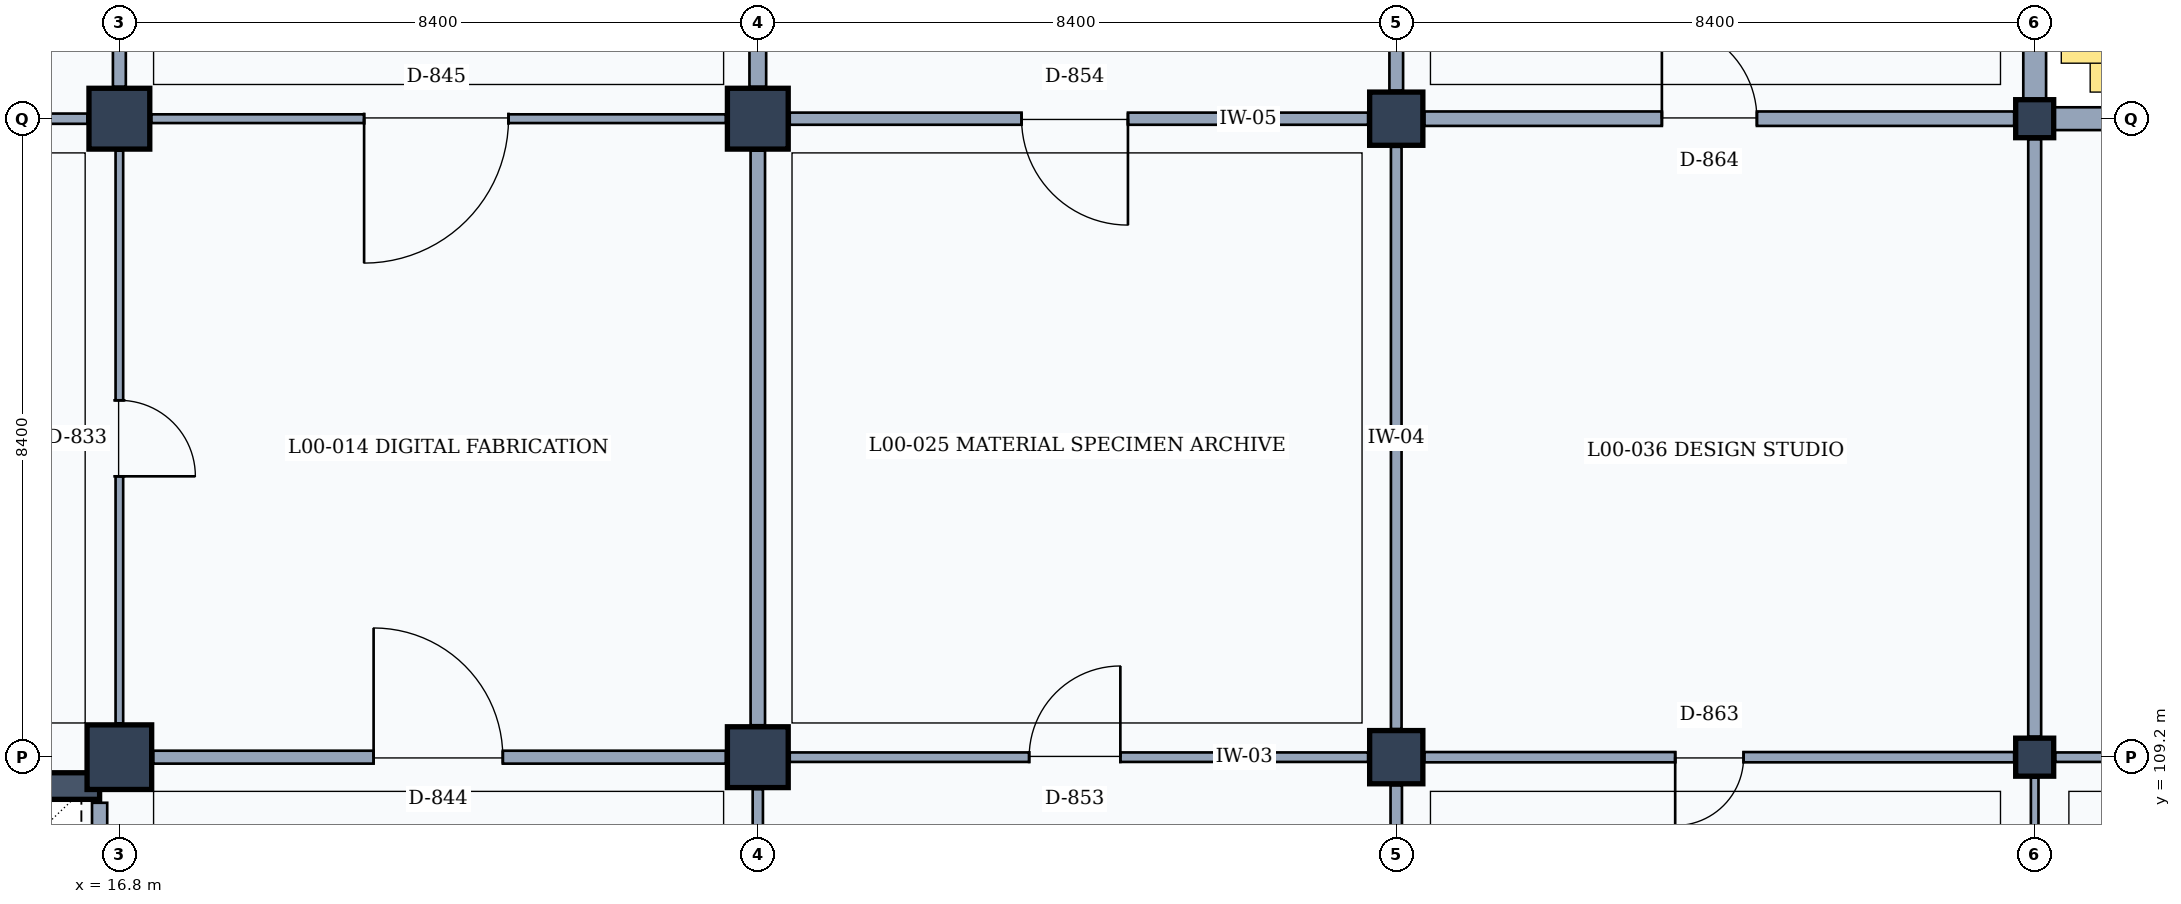
"""IFC4 building model, lengths in metres.
Left out: names, types, materials, properties, quantities, classifications, styles, units other than length and angle.
Written with IfcOpenShell. Run it as: python <this file> out.ifc"""

import sys

from ifc_helpers import new_model, si_unit, direction, frame, frame_2d, origin, origin_2d, place, context, subcontext, project, spatial, rectangle, extrude, element, fill, save


model = new_model("IFC4")
c1 = context("Model", 3, precision=1e-05, world=origin(), true_north=direction((0.0, 1.0)))
c2 = subcontext(c1, "Body", "Model", "MODEL_VIEW")
j1 = project(units=[si_unit("LENGTHUNIT", "METRE"), si_unit("PLANEANGLEUNIT", "RADIAN")], contexts=[c1])
p1 = place(None, origin())
s1 = spatial("IfcSite", under=j1, at=p1, CompositionType="ELEMENT")
p2 = place(p1, origin())
s2 = spatial("IfcBuilding", under=s1, at=p2, CompositionType="ELEMENT")
p3 = place(p2, origin())
s3 = spatial("IfcBuildingStorey", under=s2, at=p3, CompositionType="ELEMENT", Elevation=0.0)
p4 = place(p3, frame((16.8, 109.2, 0.0), z_axis=(0.0, 0.0, 1.0), x_axis=(1.0, 0.0, 0.0)))
e1 = element("IfcColumn", 1, at=p4, inside=s3, PredefinedType="COLUMN", context=c2, shape_type="SweptSolid", body=[
    extrude(rectangle(XDim=0.85, YDim=0.85, at=origin_2d()), origin(), (0.0, 0.0, 1.0), 4.8),
])
for number, where, z_axis, x_axis in (
    (2, (16.8, 117.6, 0.0), (0.0, 0.0, 1.0), (1.0, 0.0, 0.0)),
    (3, (25.2, 109.2, 0.0), (0.0, 0.0, 1.0), (1.0, 0.0, 0.0)),
    (4, (25.2, 117.6, 0.0), (0.0, 0.0, 1.0), (1.0, 0.0, 0.0)),
):
    element("IfcColumn", number, at=place(p3, frame(where, z_axis=z_axis, x_axis=x_axis)), inside=s3, PredefinedType="COLUMN", context=c2, shape_type="SweptSolid", body=[
        extrude(rectangle(XDim=0.8, YDim=0.8, at=origin_2d()), origin(), (0.0, 0.0, 1.0), 4.8),
    ])
for number, where, z_axis, x_axis in (
    (5, (33.6, 109.2, 0.0), (0.0, 0.0, 1.0), (1.0, 0.0, 0.0)),
    (6, (33.6, 117.6, 0.0), (0.0, 0.0, 1.0), (1.0, 0.0, 0.0)),
):
    element("IfcColumn", number, at=place(p3, frame(where, z_axis=z_axis, x_axis=x_axis)), inside=s3, PredefinedType="COLUMN", context=c2, shape_type="SweptSolid", body=[
        extrude(rectangle(XDim=0.7, YDim=0.7, at=origin_2d()), origin(), (0.0, 0.0, 1.0), 4.8),
    ])
for number, where, z_axis, x_axis in (
    (7, (42.0, 109.2, 0.0), (0.0, 0.0, 1.0), (1.0, 0.0, 0.0)),
    (8, (42.0, 117.6, 0.0), (0.0, 0.0, 1.0), (1.0, 0.0, 0.0)),
):
    element("IfcColumn", number, at=place(p3, frame(where, z_axis=z_axis, x_axis=x_axis)), inside=s3, PredefinedType="COLUMN", context=c2, shape_type="SweptSolid", body=[
        extrude(rectangle(XDim=0.5, YDim=0.5, at=origin_2d()), origin(), (0.0, 0.0, 1.0), 4.8),
    ])
p5 = place(p3, frame((42.0, 125.75, 0.0), z_axis=(0.0, 0.0, 1.0), x_axis=(0.0, -1.0, 0.0)))
e9 = element("IfcWall", 9, at=p5, inside=s3, PredefinedType="SOLIDWALL", context=c2, shape_type="SweptSolid", body=[
    extrude(rectangle(XDim=7.9, YDim=0.3, at=frame_2d((3.95, 0.0))), origin(), (0.0, 0.0, 1.0), 3.96),
])
p6 = place(p5, frame((3.05, 0.0, 0.95)))
e10 = element("IfcOpeningElement", 10, at=p6, cuts=e9, PredefinedType="OPENING", context=c2, shape_type="SweptSolid", body=[
    extrude(rectangle(XDim=1.8, YDim=1.5, at=frame_2d((0.9, 0.75))), frame((0.0, 0.16, 0.0), z_axis=(0.0, -1.0, 0.0), x_axis=(1.0, 0.0, 0.0)), (0.0, 0.0, 1.0), 0.32),
])
p7 = place(p3, frame((42.25, 117.6, 0.0), z_axis=(0.0, 0.0, 1.0), x_axis=(1.0, 0.0, 0.0)))
e11 = element("IfcWall", 11, at=p7, inside=s3, PredefinedType="SOLIDWALL", context=c2, shape_type="SweptSolid", body=[
    extrude(rectangle(XDim=7.85, YDim=0.3, at=frame_2d((3.925, 0.0))), origin(), (0.0, 0.0, 1.0), 3.96),
])
p8 = place(p7, frame((2.525, 0.0, 0.95)))
e12 = element("IfcOpeningElement", 12, at=p8, cuts=e11, PredefinedType="OPENING", context=c2, shape_type="SweptSolid", body=[
    extrude(rectangle(XDim=2.8, YDim=1.65, at=frame_2d((1.4, 0.825))), frame((0.0, 0.16, 0.0), z_axis=(0.0, -1.0, 0.0), x_axis=(1.0, 0.0, 0.0)), (0.0, 0.0, 1.0), 0.32),
])
p9 = place(p3, frame((8.665, 108.82, 0.0), z_axis=(0.0, 0.0, 1.0), x_axis=(1.0, 0.0, 0.0)))
e13 = element("IfcWall", 13, at=p9, inside=s3, PredefinedType="SHEAR", context=c2, shape_type="SweptSolid", body=[
    extrude(rectangle(XDim=7.875, YDim=0.35, at=frame_2d((3.938, 0.0))), origin(), (0.0, 0.0, 1.0), 4.55),
])
p10 = place(p3, frame((16.54, 108.6, 0.0), z_axis=(0.0, 0.0, 1.0), x_axis=(0.0, -1.0, 0.0)))
e14 = element("IfcWall", 14, at=p10, inside=s3, PredefinedType="PARTITIONING", context=c2, shape_type="SweptSolid", body=[
    extrude(rectangle(XDim=7.2, YDim=0.2, at=frame_2d((3.6, 0.0))), origin(), (0.0, 0.0, 1.0), 3.92),
])
p11 = place(p10, frame((3.55, 0.0, 0.0)))
e15 = element("IfcOpeningElement", 15, at=p11, cuts=e14, PredefinedType="OPENING", context=c2, shape_type="SweptSolid", body=[
    extrude(rectangle(XDim=1.1, YDim=2.15, at=frame_2d((0.55, 1.075))), frame((0.0, 0.11, 0.0), z_axis=(0.0, -1.0, 0.0), x_axis=(1.0, 0.0, 0.0)), (0.0, 0.0, 1.0), 0.22),
])
p12 = place(p3, frame((16.8, 109.645, 0.0), z_axis=(0.0, 0.0, 1.0), x_axis=(0.0, 1.0, 0.0)))
e16 = element("IfcWall", 16, at=p12, inside=s3, PredefinedType="MOVABLE", context=c2, shape_type="SweptSolid", body=[
    extrude(rectangle(XDim=7.535, YDim=0.1, at=frame_2d((3.768, 0.0))), origin(), (0.0, 0.0, 1.0), 3.92),
])
p13 = place(p12, frame((3.25, 0.0, 0.0)))
e17 = element("IfcOpeningElement", 17, at=p13, cuts=e16, PredefinedType="OPENING", context=c2, shape_type="SweptSolid", body=[
    extrude(rectangle(XDim=1.0, YDim=2.15, at=frame_2d((0.5, 1.075))), frame((0.0, 0.06, 0.0), z_axis=(0.0, -1.0, 0.0), x_axis=(1.0, 0.0, 0.0)), (0.0, 0.0, 1.0), 0.12),
])
p14 = place(p3, frame((8.82, 117.6, 0.0), z_axis=(0.0, 0.0, 1.0), x_axis=(1.0, 0.0, 0.0)))
e18 = element("IfcWall", 18, at=p14, inside=s3, PredefinedType="PARTITIONING", context=c2, shape_type="SweptSolid", body=[
    extrude(rectangle(XDim=7.56, YDim=0.135, at=frame_2d((3.78, 0.0))), origin(), (0.0, 0.0, 1.0), 3.87),
])
p15 = place(p14, frame((3.275, 0.0, 0.0)))
e19 = element("IfcOpeningElement", 19, at=p15, cuts=e18, PredefinedType="OPENING", context=c2, shape_type="SweptSolid", body=[
    extrude(rectangle(XDim=0.95, YDim=2.15, at=frame_2d((0.475, 1.075))), frame((0.0, 0.077, 0.0), z_axis=(0.0, -1.0, 0.0), x_axis=(1.0, 0.0, 0.0)), (0.0, 0.0, 1.0), 0.155),
])
p16 = place(p3, frame((16.8, 118.02, 0.0), z_axis=(0.0, 0.0, 1.0), x_axis=(0.0, 1.0, 0.0)))
e20 = element("IfcWall", 20, at=p16, inside=s3, PredefinedType="PARTITIONING", context=c2, shape_type="SweptSolid", body=[
    extrude(rectangle(XDim=7.56, YDim=0.17, at=frame_2d((3.78, 0.0))), origin(), (0.0, 0.0, 1.0), 3.92),
])
p17 = place(p3, frame((25.2, 101.22, 0.0), z_axis=(0.0, 0.0, 1.0), x_axis=(0.0, 1.0, 0.0)))
e21 = element("IfcWall", 21, at=p17, inside=s3, PredefinedType="PARTITIONING", context=c2, shape_type="SweptSolid", body=[
    extrude(rectangle(XDim=7.56, YDim=0.135, at=frame_2d((3.78, 0.0))), origin(), (0.0, 0.0, 1.0), 3.92),
])
p18 = place(p17, frame((2.975, 0.0, 0.0)))
e22 = element("IfcOpeningElement", 22, at=p18, cuts=e21, PredefinedType="OPENING", context=c2, shape_type="SweptSolid", body=[
    extrude(rectangle(XDim=1.55, YDim=2.35, at=frame_2d((0.775, 1.175))), frame((0.0, 0.077, 0.0), z_axis=(0.0, -1.0, 0.0), x_axis=(1.0, 0.0, 0.0)), (0.0, 0.0, 1.0), 0.155),
])
p19 = place(p3, frame((17.245, 109.2, 0.0), z_axis=(0.0, 0.0, 1.0), x_axis=(1.0, 0.0, 0.0)))
e23 = element("IfcWall", 23, at=p19, inside=s3, PredefinedType="PARTITIONING", context=c2, shape_type="SweptSolid", body=[
    extrude(rectangle(XDim=7.535, YDim=0.17, at=frame_2d((3.768, 0.0))), origin(), (0.0, 0.0, 1.0), 3.87),
])
p20 = place(p19, frame((2.9, 0.0, 0.0)))
e24 = element("IfcOpeningElement", 24, at=p20, cuts=e23, PredefinedType="OPENING", context=c2, shape_type="SweptSolid", body=[
    extrude(rectangle(XDim=1.7, YDim=2.3, at=frame_2d((0.85, 1.15))), frame((0.0, 0.095, 0.0), z_axis=(0.0, -1.0, 0.0), x_axis=(1.0, 0.0, 0.0)), (0.0, 0.0, 1.0), 0.19),
])
p21 = place(p3, frame((25.2, 109.62, 0.0), z_axis=(0.0, 0.0, 1.0), x_axis=(0.0, 1.0, 0.0)))
e25 = element("IfcWall", 25, at=p21, inside=s3, PredefinedType="PARTITIONING", context=c2, shape_type="SweptSolid", body=[
    extrude(rectangle(XDim=7.56, YDim=0.19, at=frame_2d((3.78, 0.0))), origin(), (0.0, 0.0, 1.0), 3.92),
])
p22 = place(p3, frame((17.22, 117.6, 0.0), z_axis=(0.0, 0.0, 1.0), x_axis=(1.0, 0.0, 0.0)))
e26 = element("IfcWall", 26, at=p22, inside=s3, PredefinedType="PARTITIONING", context=c2, shape_type="SweptSolid", body=[
    extrude(rectangle(XDim=7.56, YDim=0.115, at=frame_2d((3.78, 0.0))), origin(), (0.0, 0.0, 1.0), 3.87),
])
p23 = place(p22, frame((2.8, 0.0, 0.0)))
e27 = element("IfcOpeningElement", 27, at=p23, cuts=e26, PredefinedType="OPENING", context=c2, shape_type="SweptSolid", body=[
    extrude(rectangle(XDim=1.9, YDim=2.4, at=frame_2d((0.95, 1.2))), frame((0.0, 0.067, 0.0), z_axis=(0.0, -1.0, 0.0), x_axis=(1.0, 0.0, 0.0)), (0.0, 0.0, 1.0), 0.135),
])
p24 = place(p3, frame((25.2, 118.02, 0.0), z_axis=(0.0, 0.0, 1.0), x_axis=(0.0, 1.0, 0.0)))
e28 = element("IfcWall", 28, at=p24, inside=s3, PredefinedType="PARTITIONING", context=c2, shape_type="SweptSolid", body=[
    extrude(rectangle(XDim=7.56, YDim=0.22, at=frame_2d((3.78, 0.0))), origin(), (0.0, 0.0, 1.0), 3.92),
])
p25 = place(p3, frame((33.6, 101.17, 0.0), z_axis=(0.0, 0.0, 1.0), x_axis=(0.0, 1.0, 0.0)))
e29 = element("IfcWall", 29, at=p25, inside=s3, PredefinedType="PARTITIONING", context=c2, shape_type="SweptSolid", body=[
    extrude(rectangle(XDim=7.66, YDim=0.15, at=frame_2d((3.83, 0.0))), origin(), (0.0, 0.0, 1.0), 3.92),
])
p26 = place(p25, frame((2.85, 0.0, 0.0)))
e30 = element("IfcOpeningElement", 30, at=p26, cuts=e29, PredefinedType="OPENING", context=c2, shape_type="SweptSolid", body=[
    extrude(rectangle(XDim=1.8, YDim=2.3, at=frame_2d((0.9, 1.15))), frame((0.0, 0.085, 0.0), z_axis=(0.0, -1.0, 0.0), x_axis=(1.0, 0.0, 0.0)), (0.0, 0.0, 1.0), 0.17),
])
p27 = place(p3, frame((25.62, 109.2, 0.0), z_axis=(0.0, 0.0, 1.0), x_axis=(1.0, 0.0, 0.0)))
e31 = element("IfcWall", 31, at=p27, inside=s3, PredefinedType="PARTITIONING", context=c2, shape_type="SweptSolid", body=[
    extrude(rectangle(XDim=7.61, YDim=0.125, at=frame_2d((3.805, 0.0))), origin(), (0.0, 0.0, 1.0), 3.87),
])
p28 = place(p27, frame((3.15, 0.0, 0.0)))
e32 = element("IfcOpeningElement", 32, at=p28, cuts=e31, PredefinedType="OPENING", context=c2, shape_type="SweptSolid", body=[
    extrude(rectangle(XDim=1.2, YDim=2.2, at=frame_2d((0.6, 1.1))), frame((0.0, 0.073, 0.0), z_axis=(0.0, -1.0, 0.0), x_axis=(1.0, 0.0, 0.0)), (0.0, 0.0, 1.0), 0.145),
])
p29 = place(p3, frame((33.6, 109.57, 0.0), z_axis=(0.0, 0.0, 1.0), x_axis=(0.0, 1.0, 0.0)))
e33 = element("IfcWall", 33, at=p29, inside=s3, PredefinedType="PARTITIONING", context=c2, shape_type="SweptSolid", body=[
    extrude(rectangle(XDim=7.66, YDim=0.14, at=frame_2d((3.83, 0.0))), origin(), (0.0, 0.0, 1.0), 3.92),
])
p30 = place(p3, frame((25.62, 117.6, 0.0), z_axis=(0.0, 0.0, 1.0), x_axis=(1.0, 0.0, 0.0)))
e34 = element("IfcWall", 34, at=p30, inside=s3, PredefinedType="PARTITIONING", context=c2, shape_type="SweptSolid", body=[
    extrude(rectangle(XDim=7.61, YDim=0.16, at=frame_2d((3.805, 0.0))), origin(), (0.0, 0.0, 1.0), 3.87),
])
p31 = place(p30, frame((3.05, 0.0, 0.0)))
e35 = element("IfcOpeningElement", 35, at=p31, cuts=e34, PredefinedType="OPENING", context=c2, shape_type="SweptSolid", body=[
    extrude(rectangle(XDim=1.4, YDim=2.25, at=frame_2d((0.7, 1.125))), frame((0.0, 0.09, 0.0), z_axis=(0.0, -1.0, 0.0), x_axis=(1.0, 0.0, 0.0)), (0.0, 0.0, 1.0), 0.18),
])
p32 = place(p3, frame((33.6, 117.97, 0.0), z_axis=(0.0, 0.0, 1.0), x_axis=(0.0, 1.0, 0.0)))
e36 = element("IfcWall", 36, at=p32, inside=s3, PredefinedType="PARTITIONING", context=c2, shape_type="SweptSolid", body=[
    extrude(rectangle(XDim=7.66, YDim=0.18, at=frame_2d((3.83, 0.0))), origin(), (0.0, 0.0, 1.0), 3.92),
])
p33 = place(p3, frame((42.0, 101.07, 0.0), z_axis=(0.0, 0.0, 1.0), x_axis=(0.0, 1.0, 0.0)))
e37 = element("IfcWall", 37, at=p33, inside=s3, PredefinedType="MOVABLE", context=c2, shape_type="SweptSolid", body=[
    extrude(rectangle(XDim=7.86, YDim=0.1, at=frame_2d((3.93, 0.0))), origin(), (0.0, 0.0, 1.0), 3.92),
])
p34 = place(p33, frame((2.8, 0.0, 0.0)))
e38 = element("IfcOpeningElement", 38, at=p34, cuts=e37, PredefinedType="OPENING", context=c2, shape_type="SweptSolid", body=[
    extrude(rectangle(XDim=1.9, YDim=2.4, at=frame_2d((0.95, 1.2))), frame((0.0, 0.06, 0.0), z_axis=(0.0, -1.0, 0.0), x_axis=(1.0, 0.0, 0.0)), (0.0, 0.0, 1.0), 0.12),
])
p35 = place(p3, frame((33.97, 109.2, 0.0), z_axis=(0.0, 0.0, 1.0), x_axis=(1.0, 0.0, 0.0)))
e39 = element("IfcWall", 39, at=p35, inside=s3, PredefinedType="PARTITIONING", context=c2, shape_type="SweptSolid", body=[
    extrude(rectangle(XDim=7.76, YDim=0.135, at=frame_2d((3.88, 0.0))), origin(), (0.0, 0.0, 1.0), 3.87),
])
p36 = place(p35, frame((3.3, 0.0, 0.0)))
e40 = element("IfcOpeningElement", 40, at=p36, cuts=e39, PredefinedType="OPENING", context=c2, shape_type="SweptSolid", body=[
    extrude(rectangle(XDim=0.9, YDim=2.1, at=frame_2d((0.45, 1.05))), frame((0.0, 0.077, 0.0), z_axis=(0.0, -1.0, 0.0), x_axis=(1.0, 0.0, 0.0)), (0.0, 0.0, 1.0), 0.155),
])
p37 = place(p3, frame((42.0, 109.47, 0.0), z_axis=(0.0, 0.0, 1.0), x_axis=(0.0, 1.0, 0.0)))
e41 = element("IfcWall", 41, at=p37, inside=s3, PredefinedType="PARTITIONING", context=c2, shape_type="SweptSolid", body=[
    extrude(rectangle(XDim=7.86, YDim=0.17, at=frame_2d((3.93, 0.0))), origin(), (0.0, 0.0, 1.0), 3.92),
])
p38 = place(p3, frame((33.97, 117.6, 0.0), z_axis=(0.0, 0.0, 1.0), x_axis=(1.0, 0.0, 0.0)))
e42 = element("IfcWall", 42, at=p38, inside=s3, PredefinedType="PARTITIONING", context=c2, shape_type="SweptSolid", body=[
    extrude(rectangle(XDim=7.76, YDim=0.19, at=frame_2d((3.88, 0.0))), origin(), (0.0, 0.0, 1.0), 3.87),
])
p39 = place(p38, frame((3.125, 0.0, 0.0)))
e43 = element("IfcOpeningElement", 43, at=p39, cuts=e42, PredefinedType="OPENING", context=c2, shape_type="SweptSolid", body=[
    extrude(rectangle(XDim=1.25, YDim=2.3, at=frame_2d((0.625, 1.15))), frame((0.0, 0.105, 0.0), z_axis=(0.0, -1.0, 0.0), x_axis=(1.0, 0.0, 0.0)), (0.0, 0.0, 1.0), 0.21),
])
p40 = place(p3, frame((42.27, 109.2, 0.0), z_axis=(0.0, 0.0, 1.0), x_axis=(1.0, 0.0, 0.0)))
e44 = element("IfcWall", 44, at=p40, inside=s3, PredefinedType="PARTITIONING", context=c2, shape_type="SweptSolid", body=[
    extrude(rectangle(XDim=7.81, YDim=0.125, at=frame_2d((3.905, 0.0))), origin(), (0.0, 0.0, 1.0), 3.86),
])
p41 = place(p40, frame((3.275, 0.0, 0.0)))
e45 = element("IfcOpeningElement", 45, at=p41, cuts=e44, PredefinedType="OPENING", context=c2, shape_type="SweptSolid", body=[
    extrude(rectangle(XDim=0.95, YDim=2.15, at=frame_2d((0.475, 1.075))), frame((0.0, 0.073, 0.0), z_axis=(0.0, -1.0, 0.0), x_axis=(1.0, 0.0, 0.0)), (0.0, 0.0, 1.0), 0.145),
])
p42 = place(p13, frame((1.0, 0.0, 0.0), z_axis=(0.0, 0.0, 1.0), x_axis=(-1.0, 0.0, 0.0)))
e46 = element("IfcDoor", 46, at=p42, inside=s3, OperationType="SINGLE_SWING_RIGHT", PredefinedType="DOOR", context=c2, shape_type="SweptSolid", body=[
    extrude(rectangle(XDim=1.0, YDim=2.15, at=frame_2d((0.5, 1.075))), frame((0.0, 0.025, 0.0), z_axis=(0.0, -1.0, 0.0), x_axis=(1.0, 0.0, 0.0)), (0.0, 0.0, 1.0), 0.05),
])
fill(e17, e46)
p43 = place(p20, origin())
e47 = element("IfcDoor", 47, at=p43, inside=s3, OperationType="SINGLE_SWING_LEFT", PredefinedType="DOOR", context=c2, shape_type="SweptSolid", body=[
    extrude(rectangle(XDim=1.7, YDim=2.3, at=frame_2d((0.85, 1.15))), frame((0.0, 0.025, 0.0), z_axis=(0.0, -1.0, 0.0), x_axis=(1.0, 0.0, 0.0)), (0.0, 0.0, 1.0), 0.05),
])
fill(e24, e47)
p44 = place(p23, frame((1.9, 0.0, 0.0), z_axis=(0.0, 0.0, 1.0), x_axis=(-1.0, 0.0, 0.0)))
e48 = element("IfcDoor", 48, at=p44, inside=s3, OperationType="SINGLE_SWING_RIGHT", PredefinedType="DOOR", context=c2, shape_type="SweptSolid", body=[
    extrude(rectangle(XDim=1.9, YDim=2.4, at=frame_2d((0.95, 1.2))), frame((0.0, 0.025, 0.0), z_axis=(0.0, -1.0, 0.0), x_axis=(1.0, 0.0, 0.0)), (0.0, 0.0, 1.0), 0.05),
])
fill(e27, e48)
p45 = place(p28, origin())
e49 = element("IfcDoor", 49, at=p45, inside=s3, OperationType="SINGLE_SWING_RIGHT", PredefinedType="DOOR", context=c2, shape_type="SweptSolid", body=[
    extrude(rectangle(XDim=1.2, YDim=2.2, at=frame_2d((0.6, 1.1))), frame((0.0, 0.025, 0.0), z_axis=(0.0, -1.0, 0.0), x_axis=(1.0, 0.0, 0.0)), (0.0, 0.0, 1.0), 0.05),
])
fill(e32, e49)
p46 = place(p31, frame((1.4, 0.0, 0.0), z_axis=(0.0, 0.0, 1.0), x_axis=(-1.0, 0.0, 0.0)))
e50 = element("IfcDoor", 50, at=p46, inside=s3, OperationType="SINGLE_SWING_LEFT", PredefinedType="DOOR", context=c2, shape_type="SweptSolid", body=[
    extrude(rectangle(XDim=1.4, YDim=2.25, at=frame_2d((0.7, 1.125))), frame((0.0, 0.025, 0.0), z_axis=(0.0, -1.0, 0.0), x_axis=(1.0, 0.0, 0.0)), (0.0, 0.0, 1.0), 0.05),
])
fill(e35, e50)
p47 = place(p36, frame((0.9, 0.0, 0.0), z_axis=(0.0, 0.0, 1.0), x_axis=(-1.0, 0.0, 0.0)))
e51 = element("IfcDoor", 51, at=p47, inside=s3, OperationType="SINGLE_SWING_RIGHT", PredefinedType="DOOR", context=c2, shape_type="SweptSolid", body=[
    extrude(rectangle(XDim=0.9, YDim=2.1, at=frame_2d((0.45, 1.05))), frame((0.0, 0.025, 0.0), z_axis=(0.0, -1.0, 0.0), x_axis=(1.0, 0.0, 0.0)), (0.0, 0.0, 1.0), 0.05),
])
fill(e40, e51)
p48 = place(p39, origin())
e52 = element("IfcDoor", 52, at=p48, inside=s3, OperationType="SINGLE_SWING_LEFT", PredefinedType="DOOR", context=c2, shape_type="SweptSolid", body=[
    extrude(rectangle(XDim=1.25, YDim=2.3, at=frame_2d((0.625, 1.15))), frame((0.0, 0.025, 0.0), z_axis=(0.0, -1.0, 0.0), x_axis=(1.0, 0.0, 0.0)), (0.0, 0.0, 1.0), 0.05),
])
fill(e43, e52)
save(model, sys.argv[1])
